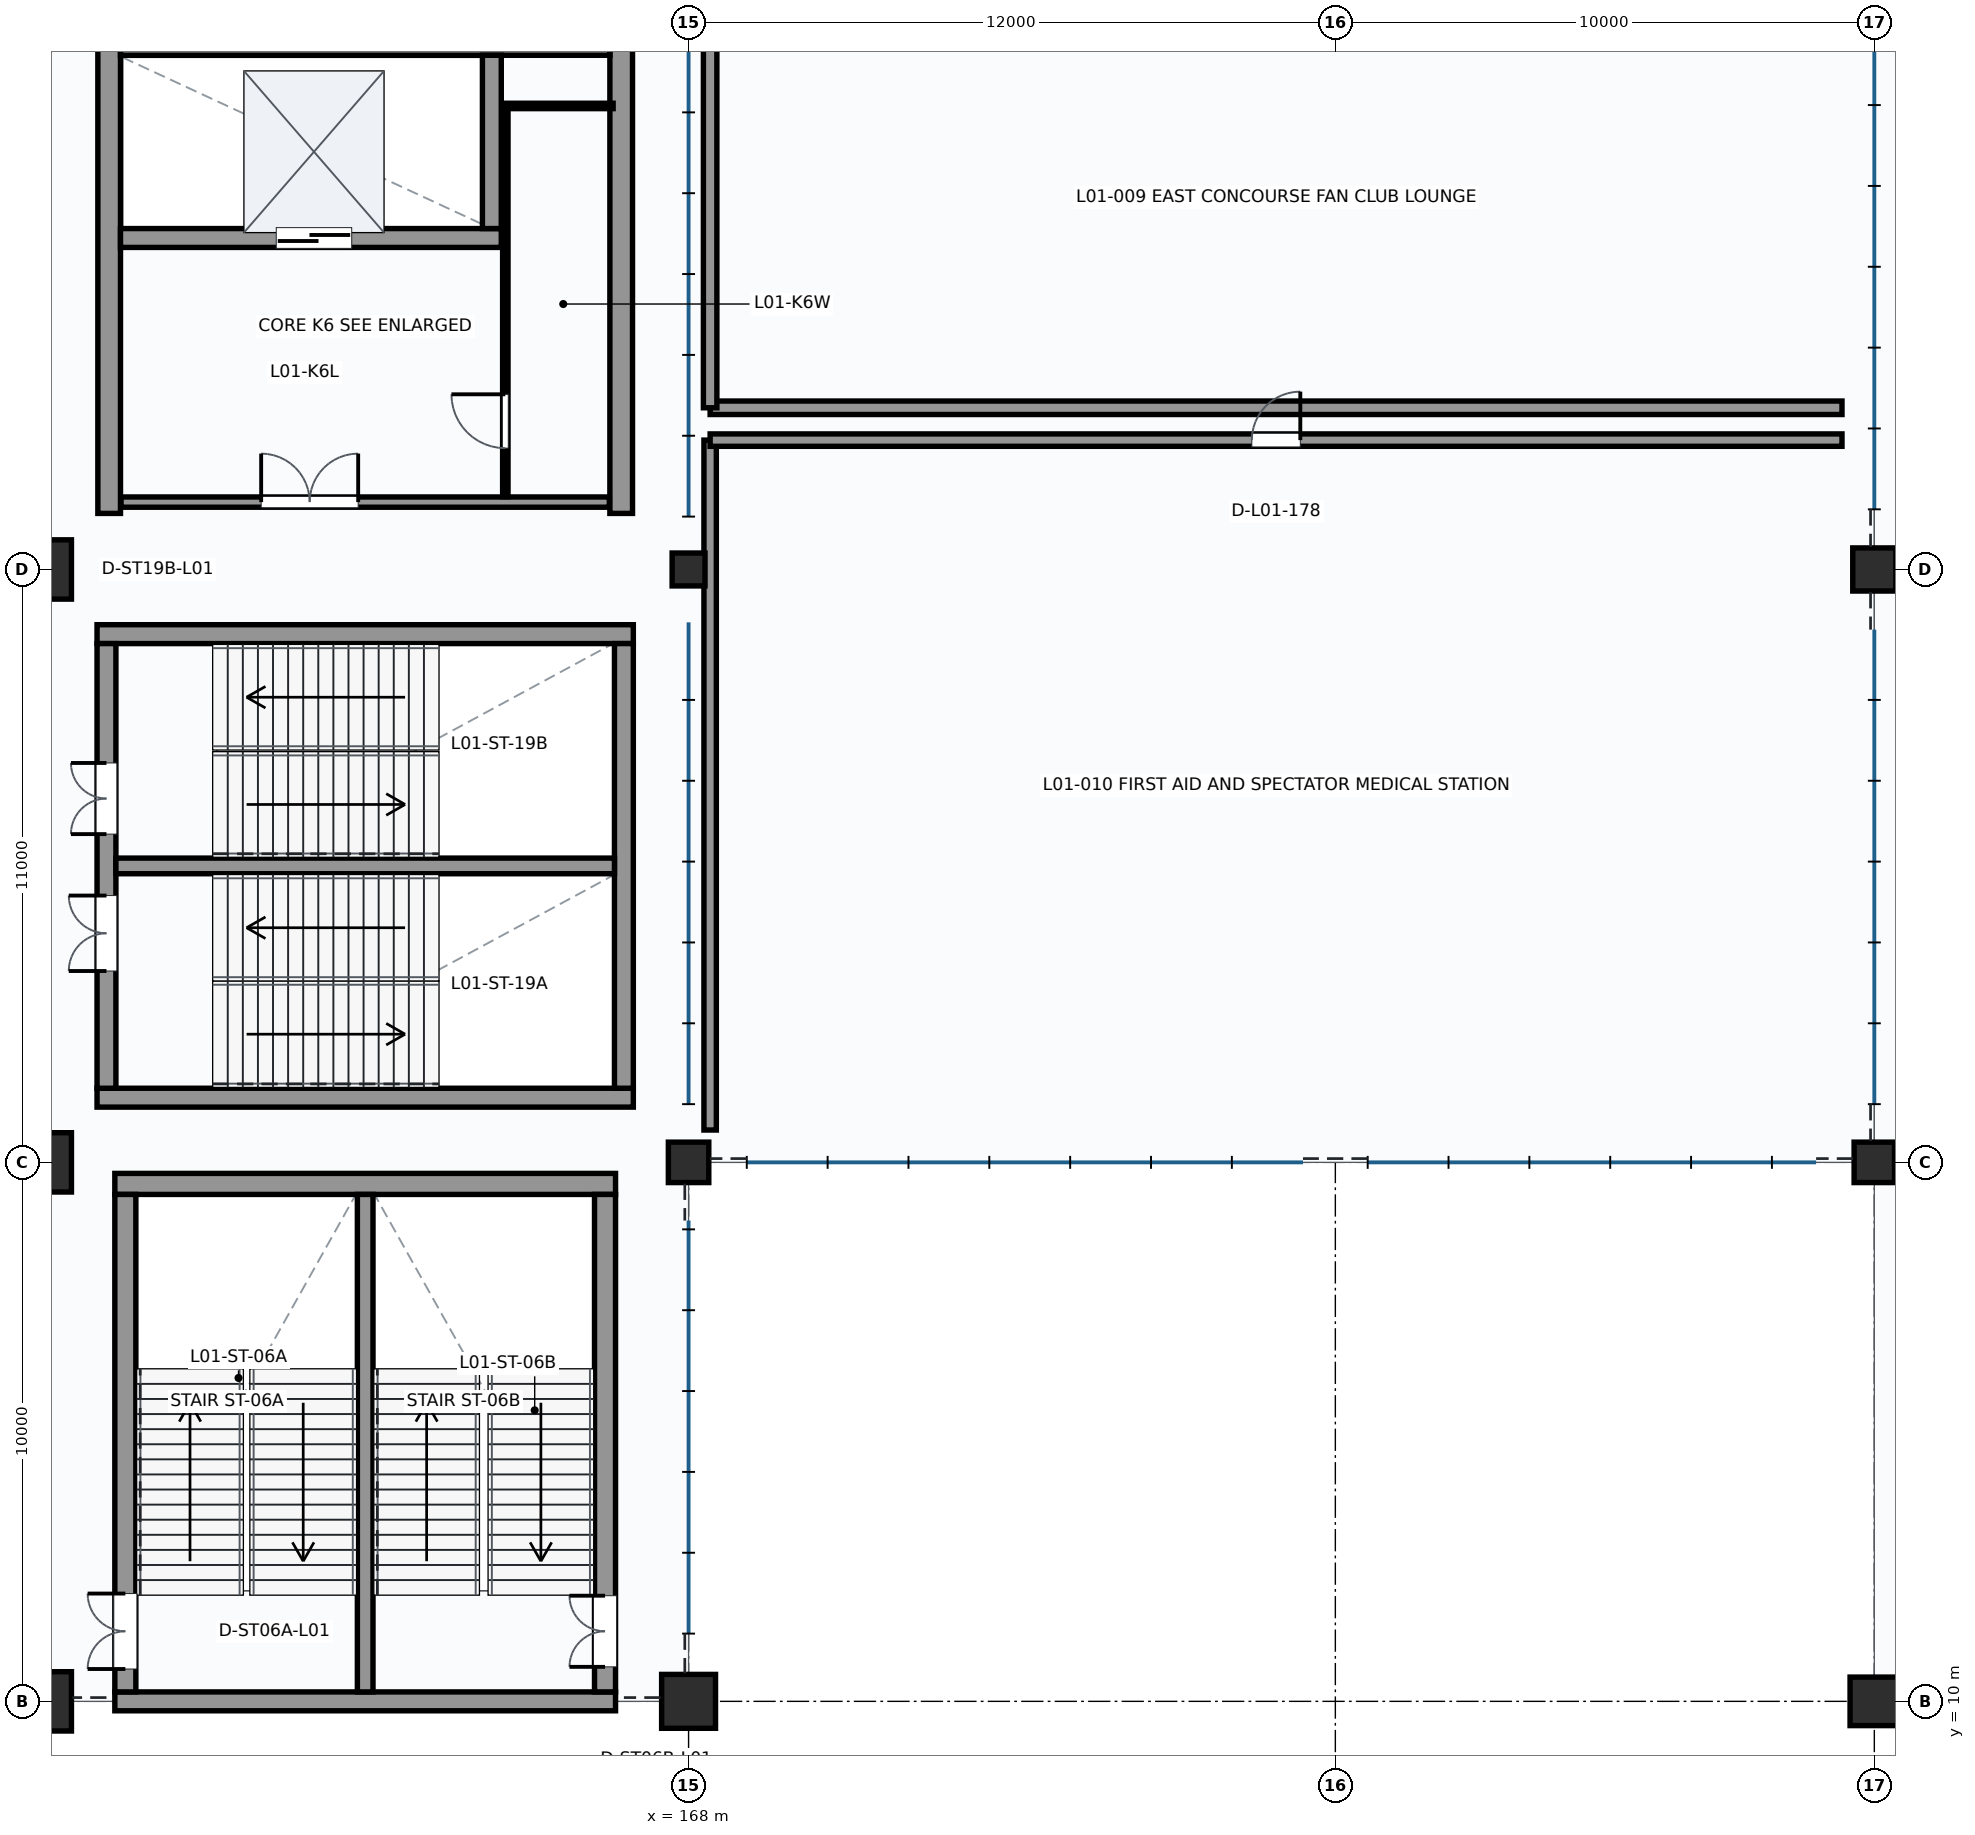
"""IFC4 building model, lengths in metres.
Left out: names, types, materials, properties, quantities, classifications, styles, units other than length and angle.
Written with IfcOpenShell. Run it as: python <this file> out.ifc"""

import sys

from ifc_helpers import new_model, si_unit, direction, frame, frame_2d, origin, origin_2d, place, context, subcontext, project, spatial, rectangle, hollow_circle, extrude, element, fill, save


model = new_model("IFC4")
c1 = context("Model", 3, precision=1e-05, world=origin(), true_north=direction((0.0, 1.0)))
c2 = subcontext(c1, "Body", "Model", "MODEL_VIEW")
j1 = project(units=[si_unit("LENGTHUNIT", "METRE"), si_unit("PLANEANGLEUNIT", "RADIAN")], contexts=[c1])
p1 = place(None, origin())
s1 = spatial("IfcSite", under=j1, at=p1, CompositionType="ELEMENT")
p2 = place(p1, origin())
s2 = spatial("IfcBuilding", under=s1, at=p2, CompositionType="ELEMENT")
p3 = place(p2, frame((0.0, 0.0, 5.4)))
s3 = spatial("IfcBuildingStorey", under=s2, at=p3, CompositionType="ELEMENT", Elevation=5.4)
for number, where, z_axis, x_axis in (
    (1, (156.0, 10.0, 0.0), (0.0, 0.0, 1.0), (1.0, 0.0, 0.0)),
    (2, (156.0, 20.0, 0.0), (0.0, 0.0, 1.0), (1.0, 0.0, 0.0)),
    (3, (156.0, 31.0, 0.0), (0.0, 0.0, 1.0), (1.0, 0.0, 0.0)),
):
    element("IfcColumn", number, at=place(p3, frame(where, z_axis=z_axis, x_axis=x_axis)), inside=s3, PredefinedType="COLUMN", context=c2, shape_type="SweptSolid", body=[
        extrude(rectangle(XDim=1.1, YDim=1.1, at=origin_2d()), origin(), (0.0, 0.0, 1.0), 4.8),
    ])
p4 = place(p3, frame((168.0, 10.0, 0.0), z_axis=(0.0, 0.0, 1.0), x_axis=(1.0, 0.0, 0.0)))
e4 = element("IfcColumn", 4, at=p4, inside=s3, PredefinedType="COLUMN", context=c2, shape_type="SweptSolid", body=[
    extrude(rectangle(XDim=1.0, YDim=1.0, at=origin_2d()), origin(), (0.0, 0.0, 1.0), 4.8),
])
p5 = place(p3, frame((168.0, 20.0, 0.0), z_axis=(0.0, 0.0, 1.0), x_axis=(1.0, 0.0, 0.0)))
e5 = element("IfcColumn", 5, at=p5, inside=s3, PredefinedType="COLUMN", context=c2, shape_type="SweptSolid", body=[
    extrude(rectangle(XDim=0.75, YDim=0.75, at=origin_2d()), origin(), (0.0, 0.0, 1.0), 4.8),
])
p6 = place(p3, frame((168.0, 31.0, 0.0), z_axis=(0.0, 0.0, 1.0), x_axis=(1.0, 0.0, 0.0)))
e6 = element("IfcColumn", 6, at=p6, inside=s3, PredefinedType="COLUMN", context=c2, shape_type="SweptSolid", body=[
    extrude(hollow_circle(Radius=0.305, WallThickness=0.025, at=origin_2d()), origin(), (0.0, 0.0, 1.0), 4.8),
])
p7 = place(p3, frame((190.0, 10.0, 0.0), z_axis=(0.0, 0.0, 1.0), x_axis=(1.0, 0.0, 0.0)))
e7 = element("IfcColumn", 7, at=p7, inside=s3, PredefinedType="COLUMN", context=c2, shape_type="SweptSolid", body=[
    extrude(rectangle(XDim=0.9, YDim=0.9, at=origin_2d()), origin(), (0.0, 0.0, 1.0), 2.0),
])
p8 = place(p3, frame((190.0, 20.0, 0.0), z_axis=(0.0, 0.0, 1.0), x_axis=(1.0, 0.0, 0.0)))
e8 = element("IfcColumn", 8, at=p8, inside=s3, PredefinedType="COLUMN", context=c2, shape_type="SweptSolid", body=[
    extrude(rectangle(XDim=0.75, YDim=0.75, at=origin_2d()), origin(), (0.0, 0.0, 1.0), 2.0),
])
p9 = place(p3, frame((190.0, 31.0, 0.0), z_axis=(0.0, 0.0, 1.0), x_axis=(1.0, 0.0, 0.0)))
e9 = element("IfcColumn", 9, at=p9, inside=s3, PredefinedType="COLUMN", context=c2, shape_type="SweptSolid", body=[
    extrude(rectangle(XDim=0.8, YDim=0.8, at=origin_2d()), origin(), (0.0, 0.0, 1.0), 2.0),
])
p10 = place(p3, frame((157.355, 10.0, 0.0), z_axis=(0.0, 0.0, 1.0), x_axis=(1.0, 0.0, 0.0)))
e10 = element("IfcWall", 10, at=p10, inside=s3, PredefinedType="SHEAR", context=c2, shape_type="SweptSolid", body=[
    extrude(rectangle(XDim=9.29, YDim=0.35, at=frame_2d((4.645, 0.0))), origin(), (0.0, 0.0, 1.0), 3.984),
])
p11 = place(p3, frame((157.355, 19.6, 0.0), z_axis=(0.0, 0.0, 1.0), x_axis=(1.0, 0.0, 0.0)))
e11 = element("IfcWall", 11, at=p11, inside=s3, PredefinedType="SHEAR", context=c2, shape_type="SweptSolid", body=[
    extrude(rectangle(XDim=9.29, YDim=0.39, at=frame_2d((4.645, 0.0))), origin(), (0.0, 0.0, 1.0), 4.8),
])
p12 = place(p3, frame((157.55, 10.175, 0.0), z_axis=(0.0, 0.0, 1.0), x_axis=(0.0, 1.0, 0.0)))
e12 = element("IfcWall", 12, at=p12, inside=s3, PredefinedType="SHEAR", context=c2, shape_type="SweptSolid", body=[
    extrude(rectangle(XDim=9.23, YDim=0.39, at=frame_2d((4.615, 0.0))), origin(), (0.0, 0.0, 1.0), 4.8),
])
p13 = place(p12, frame((0.425, 0.0, 0.0)))
e13 = element("IfcOpeningElement", 13, at=p13, cuts=e12, PredefinedType="OPENING", context=c2, shape_type="SweptSolid", body=[
    extrude(rectangle(XDim=1.4, YDim=2.2, at=frame_2d((0.7, 1.1))), frame((0.0, 0.205, 0.0), z_axis=(0.0, -1.0, 0.0), x_axis=(1.0, 0.0, 0.0)), (0.0, 0.0, 1.0), 0.41),
])
p14 = place(p3, frame((166.45, 10.175, 0.0), z_axis=(0.0, 0.0, 1.0), x_axis=(0.0, 1.0, 0.0)))
e14 = element("IfcWall", 14, at=p14, inside=s3, PredefinedType="SHEAR", context=c2, shape_type="SweptSolid", body=[
    extrude(rectangle(XDim=9.23, YDim=0.39, at=frame_2d((4.615, 0.0))), origin(), (0.0, 0.0, 1.0), 4.8),
])
p15 = place(p14, frame((0.465, 0.0, 0.0)))
e15 = element("IfcOpeningElement", 15, at=p15, cuts=e14, PredefinedType="OPENING", context=c2, shape_type="SweptSolid", body=[
    extrude(rectangle(XDim=1.32, YDim=2.2, at=frame_2d((0.66, 1.1))), frame((0.0, 0.205, 0.0), z_axis=(0.0, -1.0, 0.0), x_axis=(1.0, 0.0, 0.0)), (0.0, 0.0, 1.0), 0.41),
])
p16 = place(p3, frame((162.0, 10.175, 0.0), z_axis=(0.0, 0.0, 1.0), x_axis=(0.0, 1.0, 0.0)))
e16 = element("IfcWall", 16, at=p16, inside=s3, PredefinedType="SHEAR", context=c2, shape_type="SweptSolid", body=[
    extrude(rectangle(XDim=9.23, YDim=0.29, at=frame_2d((4.615, 0.0))), origin(), (0.0, 0.0, 1.0), 4.8),
])
for number, where, z_axis, x_axis in (
    (17, (157.025, 21.2, 0.0), (0.0, 0.0, 1.0), (1.0, 0.0, 0.0)),
    (18, (157.025, 29.8, 0.0), (0.0, 0.0, 1.0), (1.0, 0.0, 0.0)),
):
    element("IfcWall", number, at=place(p3, frame(where, z_axis=z_axis, x_axis=x_axis)), inside=s3, PredefinedType="SHEAR", context=c2, shape_type="SweptSolid", body=[
        extrude(rectangle(XDim=9.95, YDim=0.35, at=frame_2d((4.975, 0.0))), origin(), (0.0, 0.0, 1.0), 4.8),
    ])
p17 = place(p3, frame((157.2, 21.375, 0.0), z_axis=(0.0, 0.0, 1.0), x_axis=(0.0, 1.0, 0.0)))
e19 = element("IfcWall", 19, at=p17, inside=s3, PredefinedType="SHEAR", context=c2, shape_type="SweptSolid", body=[
    extrude(rectangle(XDim=8.25, YDim=0.35, at=frame_2d((4.125, 0.0))), origin(), (0.0, 0.0, 1.0), 4.8),
])
p18 = place(p17, frame((2.175, 0.0, 0.0)))
e20 = element("IfcOpeningElement", 20, at=p18, cuts=e19, PredefinedType="OPENING", context=c2, shape_type="SweptSolid", body=[
    extrude(rectangle(XDim=1.4, YDim=2.2, at=frame_2d((0.7, 1.1))), frame((0.0, 0.185, 0.0), z_axis=(0.0, -1.0, 0.0), x_axis=(1.0, 0.0, 0.0)), (0.0, 0.0, 1.0), 0.37),
])
p19 = place(p17, frame((4.715, 0.0, 0.0)))
e21 = element("IfcOpeningElement", 21, at=p19, cuts=e19, PredefinedType="OPENING", context=c2, shape_type="SweptSolid", body=[
    extrude(rectangle(XDim=1.32, YDim=2.2, at=frame_2d((0.66, 1.1))), frame((0.0, 0.185, 0.0), z_axis=(0.0, -1.0, 0.0), x_axis=(1.0, 0.0, 0.0)), (0.0, 0.0, 1.0), 0.37),
])
p20 = place(p3, frame((166.8, 21.375, 0.0), z_axis=(0.0, 0.0, 1.0), x_axis=(0.0, 1.0, 0.0)))
e22 = element("IfcWall", 22, at=p20, inside=s3, PredefinedType="SHEAR", context=c2, shape_type="SweptSolid", body=[
    extrude(rectangle(XDim=8.25, YDim=0.35, at=frame_2d((4.125, 0.0))), origin(), (0.0, 0.0, 1.0), 4.8),
])
p21 = place(p3, frame((157.375, 25.5, 0.0), z_axis=(0.0, 0.0, 1.0), x_axis=(1.0, 0.0, 0.0)))
e23 = element("IfcWall", 23, at=p21, inside=s3, PredefinedType="SHEAR", context=c2, shape_type="SweptSolid", body=[
    extrude(rectangle(XDim=9.25, YDim=0.29, at=frame_2d((4.625, 0.0))), origin(), (0.0, 0.0, 1.0), 4.8),
])
for number, where, z_axis, x_axis in (
    (24, (157.25, 32.04, 0.0), (0.0, 0.0, 1.0), (0.0, 1.0, 0.0)),
    (25, (166.75, 32.04, 0.0), (0.0, 0.0, 1.0), (0.0, 1.0, 0.0)),
):
    element("IfcWall", number, at=place(p3, frame(where, z_axis=z_axis, x_axis=x_axis)), inside=s3, PredefinedType="SHEAR", context=c2, shape_type="SweptSolid", body=[
        extrude(rectangle(XDim=8.92, YDim=0.42, at=frame_2d((4.46, 0.0))), origin(), (0.0, 0.0, 1.0), 4.8),
    ])
p22 = place(p3, frame((157.46, 40.75, 0.0), z_axis=(0.0, 0.0, 1.0), x_axis=(1.0, 0.0, 0.0)))
e26 = element("IfcWall", 26, at=p22, inside=s3, PredefinedType="SHEAR", context=c2, shape_type="SweptSolid", body=[
    extrude(rectangle(XDim=9.08, YDim=0.42, at=frame_2d((4.54, 0.0))), origin(), (0.0, 0.0, 1.0), 4.8),
])
p23 = place(p3, frame((157.46, 37.15, 0.0), z_axis=(0.0, 0.0, 1.0), x_axis=(1.0, 0.0, 0.0)))
e27 = element("IfcWall", 27, at=p23, inside=s3, PredefinedType="SHEAR", context=c2, shape_type="SweptSolid", body=[
    extrude(rectangle(XDim=7.065, YDim=0.35, at=frame_2d((3.532, 0.0))), origin(), (0.0, 0.0, 1.0), 4.8),
])
p24 = place(p23, frame((2.89, 0.0, 0.0)))
e28 = element("IfcOpeningElement", 28, at=p24, cuts=e27, PredefinedType="OPENING", context=c2, shape_type="SweptSolid", body=[
    extrude(rectangle(XDim=1.4, YDim=2.3, at=frame_2d((0.7, 1.15))), frame((0.0, 0.185, 0.0), z_axis=(0.0, -1.0, 0.0), x_axis=(1.0, 0.0, 0.0)), (0.0, 0.0, 1.0), 0.37),
])
p25 = place(p3, frame((164.35, 37.325, 0.0), z_axis=(0.0, 0.0, 1.0), x_axis=(0.0, 1.0, 0.0)))
e29 = element("IfcWall", 29, at=p25, inside=s3, PredefinedType="SHEAR", context=c2, shape_type="SweptSolid", body=[
    extrude(rectangle(XDim=3.215, YDim=0.35, at=frame_2d((1.607, 0.0))), origin(), (0.0, 0.0, 1.0), 4.8),
])
p26 = place(p3, frame((157.47, 32.25, 0.0), z_axis=(0.0, 0.0, 1.0), x_axis=(1.0, 0.0, 0.0)))
e30 = element("IfcWall", 30, at=p26, inside=s3, PredefinedType="PARTITIONING", context=c2, shape_type="SweptSolid", body=[
    extrude(rectangle(XDim=9.06, YDim=0.19, at=frame_2d((4.53, 0.0))), origin(), (0.0, 0.0, 1.0), 4.47),
])
p27 = place(p26, frame((2.6, 0.0, 0.0)))
e31 = element("IfcOpeningElement", 31, at=p27, cuts=e30, PredefinedType="OPENING", context=c2, shape_type="SweptSolid", body=[
    extrude(rectangle(XDim=1.8, YDim=2.3, at=frame_2d((0.9, 1.15))), frame((0.0, 0.105, 0.0), z_axis=(0.0, -1.0, 0.0), x_axis=(1.0, 0.0, 0.0)), (0.0, 0.0, 1.0), 0.21),
])
p28 = place(p3, frame((164.6, 32.35, 0.0), z_axis=(0.0, 0.0, 1.0), x_axis=(0.0, 1.0, 0.0)))
e32 = element("IfcWall", 32, at=p28, inside=s3, PredefinedType="PARTITIONING", context=c2, shape_type="SweptSolid", body=[
    extrude(rectangle(XDim=7.25, YDim=0.1, at=frame_2d((3.625, 0.0))), origin(), (0.0, 0.0, 1.0), 4.47),
])
p29 = place(p28, frame((0.9, 0.0, 0.0)))
e33 = element("IfcOpeningElement", 33, at=p29, cuts=e32, PredefinedType="OPENING", context=c2, shape_type="SweptSolid", body=[
    extrude(rectangle(XDim=1.0, YDim=2.1, at=frame_2d((0.5, 1.05))), frame((0.0, 0.06, 0.0), z_axis=(0.0, -1.0, 0.0), x_axis=(1.0, 0.0, 0.0)), (0.0, 0.0, 1.0), 0.12),
])
p30 = place(p3, frame((164.6, 39.6, 0.0), z_axis=(0.0, 0.0, 1.0), x_axis=(1.0, 0.0, 0.0)))
e34 = element("IfcWall", 34, at=p30, inside=s3, PredefinedType="PARTITIONING", context=c2, shape_type="SweptSolid", body=[
    extrude(rectangle(XDim=2.0, YDim=0.1, at=frame_2d((1.0, 0.0))), origin(), (0.0, 0.0, 1.0), 4.47),
])
p31 = place(p3, frame((189.4, 34.0, 0.0), z_axis=(0.0, 0.0, 1.0), x_axis=(-1.0, 0.0, 0.0)))
e35 = element("IfcWall", 35, at=p31, inside=s3, PredefinedType="SOLIDWALL", context=c2, shape_type="SweptSolid", body=[
    extrude(rectangle(XDim=21.0, YDim=0.25, at=frame_2d((10.5, 0.0))), origin(), (0.0, 0.0, 1.0), 4.47),
])
p32 = place(p3, frame((168.4, 34.0, 0.0), z_axis=(0.0, 0.0, 1.0), x_axis=(0.0, 1.0, 0.0)))
e36 = element("IfcWall", 36, at=p32, inside=s3, PredefinedType="SOLIDWALL", context=c2, shape_type="SweptSolid", body=[
    extrude(rectangle(XDim=28.0, YDim=0.25, at=frame_2d((14.0, 0.0))), origin(), (0.0, 0.0, 1.0), 3.6),
])
p33 = place(p3, frame((168.4, 20.6, 0.0), z_axis=(0.0, 0.0, 1.0), x_axis=(0.0, 1.0, 0.0)))
e37 = element("IfcWall", 37, at=p33, inside=s3, PredefinedType="SOLIDWALL", context=c2, shape_type="SweptSolid", body=[
    extrude(rectangle(XDim=12.8, YDim=0.23, at=frame_2d((6.4, 0.0))), origin(), (0.0, 0.0, 1.0), 3.45),
])
p34 = place(p3, frame((168.4, 33.4, 0.0), z_axis=(0.0, 0.0, 1.0), x_axis=(1.0, 0.0, 0.0)))
e38 = element("IfcWall", 38, at=p34, inside=s3, PredefinedType="SOLIDWALL", context=c2, shape_type="SweptSolid", body=[
    extrude(rectangle(XDim=21.0, YDim=0.23, at=frame_2d((10.5, 0.0))), origin(), (0.0, 0.0, 1.0), 4.47),
])
p35 = place(p34, frame((10.05, 0.0, 0.0)))
e39 = element("IfcOpeningElement", 39, at=p35, cuts=e38, PredefinedType="OPENING", context=c2, shape_type="SweptSolid", body=[
    extrude(rectangle(XDim=0.9, YDim=2.1, at=frame_2d((0.45, 1.05))), frame((0.0, 0.125, 0.0), z_axis=(0.0, -1.0, 0.0), x_axis=(1.0, 0.0, 0.0)), (0.0, 0.0, 1.0), 0.25),
])
p36 = place(p13, frame((1.4, 0.0, 0.0), z_axis=(0.0, 0.0, 1.0), x_axis=(-1.0, 0.0, 0.0)))
e40 = element("IfcDoor", 40, at=p36, inside=s3, OperationType="DOUBLE_DOOR_SINGLE_SWING", PredefinedType="DOOR", context=c2, shape_type="SweptSolid", body=[
    extrude(rectangle(XDim=1.4, YDim=2.2, at=frame_2d((0.7, 1.1))), frame((0.0, 0.025, 0.0), z_axis=(0.0, -1.0, 0.0), x_axis=(1.0, 0.0, 0.0)), (0.0, 0.0, 1.0), 0.05),
])
fill(e13, e40)
p37 = place(p15, origin())
e41 = element("IfcDoor", 41, at=p37, inside=s3, OperationType="DOUBLE_DOOR_SINGLE_SWING", PredefinedType="DOOR", context=c2, shape_type="SweptSolid", body=[
    extrude(rectangle(XDim=1.32, YDim=2.2, at=frame_2d((0.66, 1.1))), frame((0.0, 0.025, 0.0), z_axis=(0.0, -1.0, 0.0), x_axis=(1.0, 0.0, 0.0)), (0.0, 0.0, 1.0), 0.05),
])
fill(e15, e41)
p38 = place(p18, origin())
e42 = element("IfcDoor", 42, at=p38, inside=s3, OperationType="DOUBLE_DOOR_SINGLE_SWING", PredefinedType="DOOR", context=c2, shape_type="SweptSolid", body=[
    extrude(rectangle(XDim=1.4, YDim=2.2, at=frame_2d((0.7, 1.1))), frame((0.0, 0.025, 0.0), z_axis=(0.0, -1.0, 0.0), x_axis=(1.0, 0.0, 0.0)), (0.0, 0.0, 1.0), 0.05),
])
fill(e20, e42)
p39 = place(p19, origin())
e43 = element("IfcDoor", 43, at=p39, inside=s3, OperationType="DOUBLE_DOOR_SINGLE_SWING", PredefinedType="DOOR", context=c2, shape_type="SweptSolid", body=[
    extrude(rectangle(XDim=1.32, YDim=2.2, at=frame_2d((0.66, 1.1))), frame((0.0, 0.025, 0.0), z_axis=(0.0, -1.0, 0.0), x_axis=(1.0, 0.0, 0.0)), (0.0, 0.0, 1.0), 0.05),
])
fill(e21, e43)
p40 = place(p24, origin())
e44 = element("IfcDoor", 44, at=p40, inside=s3, OperationType="SLIDING_TO_LEFT", PredefinedType="DOOR", context=c2, shape_type="SweptSolid", body=[
    extrude(rectangle(XDim=1.4, YDim=2.3, at=frame_2d((0.7, 1.15))), frame((0.0, 0.025, 0.0), z_axis=(0.0, -1.0, 0.0), x_axis=(1.0, 0.0, 0.0)), (0.0, 0.0, 1.0), 0.05),
])
fill(e28, e44)
p41 = place(p27, origin())
e45 = element("IfcDoor", 45, at=p41, inside=s3, OperationType="DOUBLE_DOOR_SINGLE_SWING", PredefinedType="DOOR", context=c2, shape_type="SweptSolid", body=[
    extrude(rectangle(XDim=1.8, YDim=2.3, at=frame_2d((0.9, 1.15))), frame((0.0, 0.025, 0.0), z_axis=(0.0, -1.0, 0.0), x_axis=(1.0, 0.0, 0.0)), (0.0, 0.0, 1.0), 0.05),
])
fill(e31, e45)
p42 = place(p29, origin())
e46 = element("IfcDoor", 46, at=p42, inside=s3, OperationType="SINGLE_SWING_RIGHT", PredefinedType="DOOR", context=c2, shape_type="SweptSolid", body=[
    extrude(rectangle(XDim=1.0, YDim=2.1, at=frame_2d((0.5, 1.05))), frame((0.0, 0.025, 0.0), z_axis=(0.0, -1.0, 0.0), x_axis=(1.0, 0.0, 0.0)), (0.0, 0.0, 1.0), 0.05),
])
fill(e33, e46)
p43 = place(p35, origin())
e47 = element("IfcDoor", 47, at=p43, inside=s3, OperationType="SINGLE_SWING_RIGHT", PredefinedType="DOOR", context=c2, shape_type="SweptSolid", body=[
    extrude(rectangle(XDim=0.9, YDim=2.1, at=frame_2d((0.45, 1.05))), frame((0.0, 0.025, 0.0), z_axis=(0.0, -1.0, 0.0), x_axis=(1.0, 0.0, 0.0)), (0.0, 0.0, 1.0), 0.05),
])
fill(e39, e47)
save(model, sys.argv[1])
